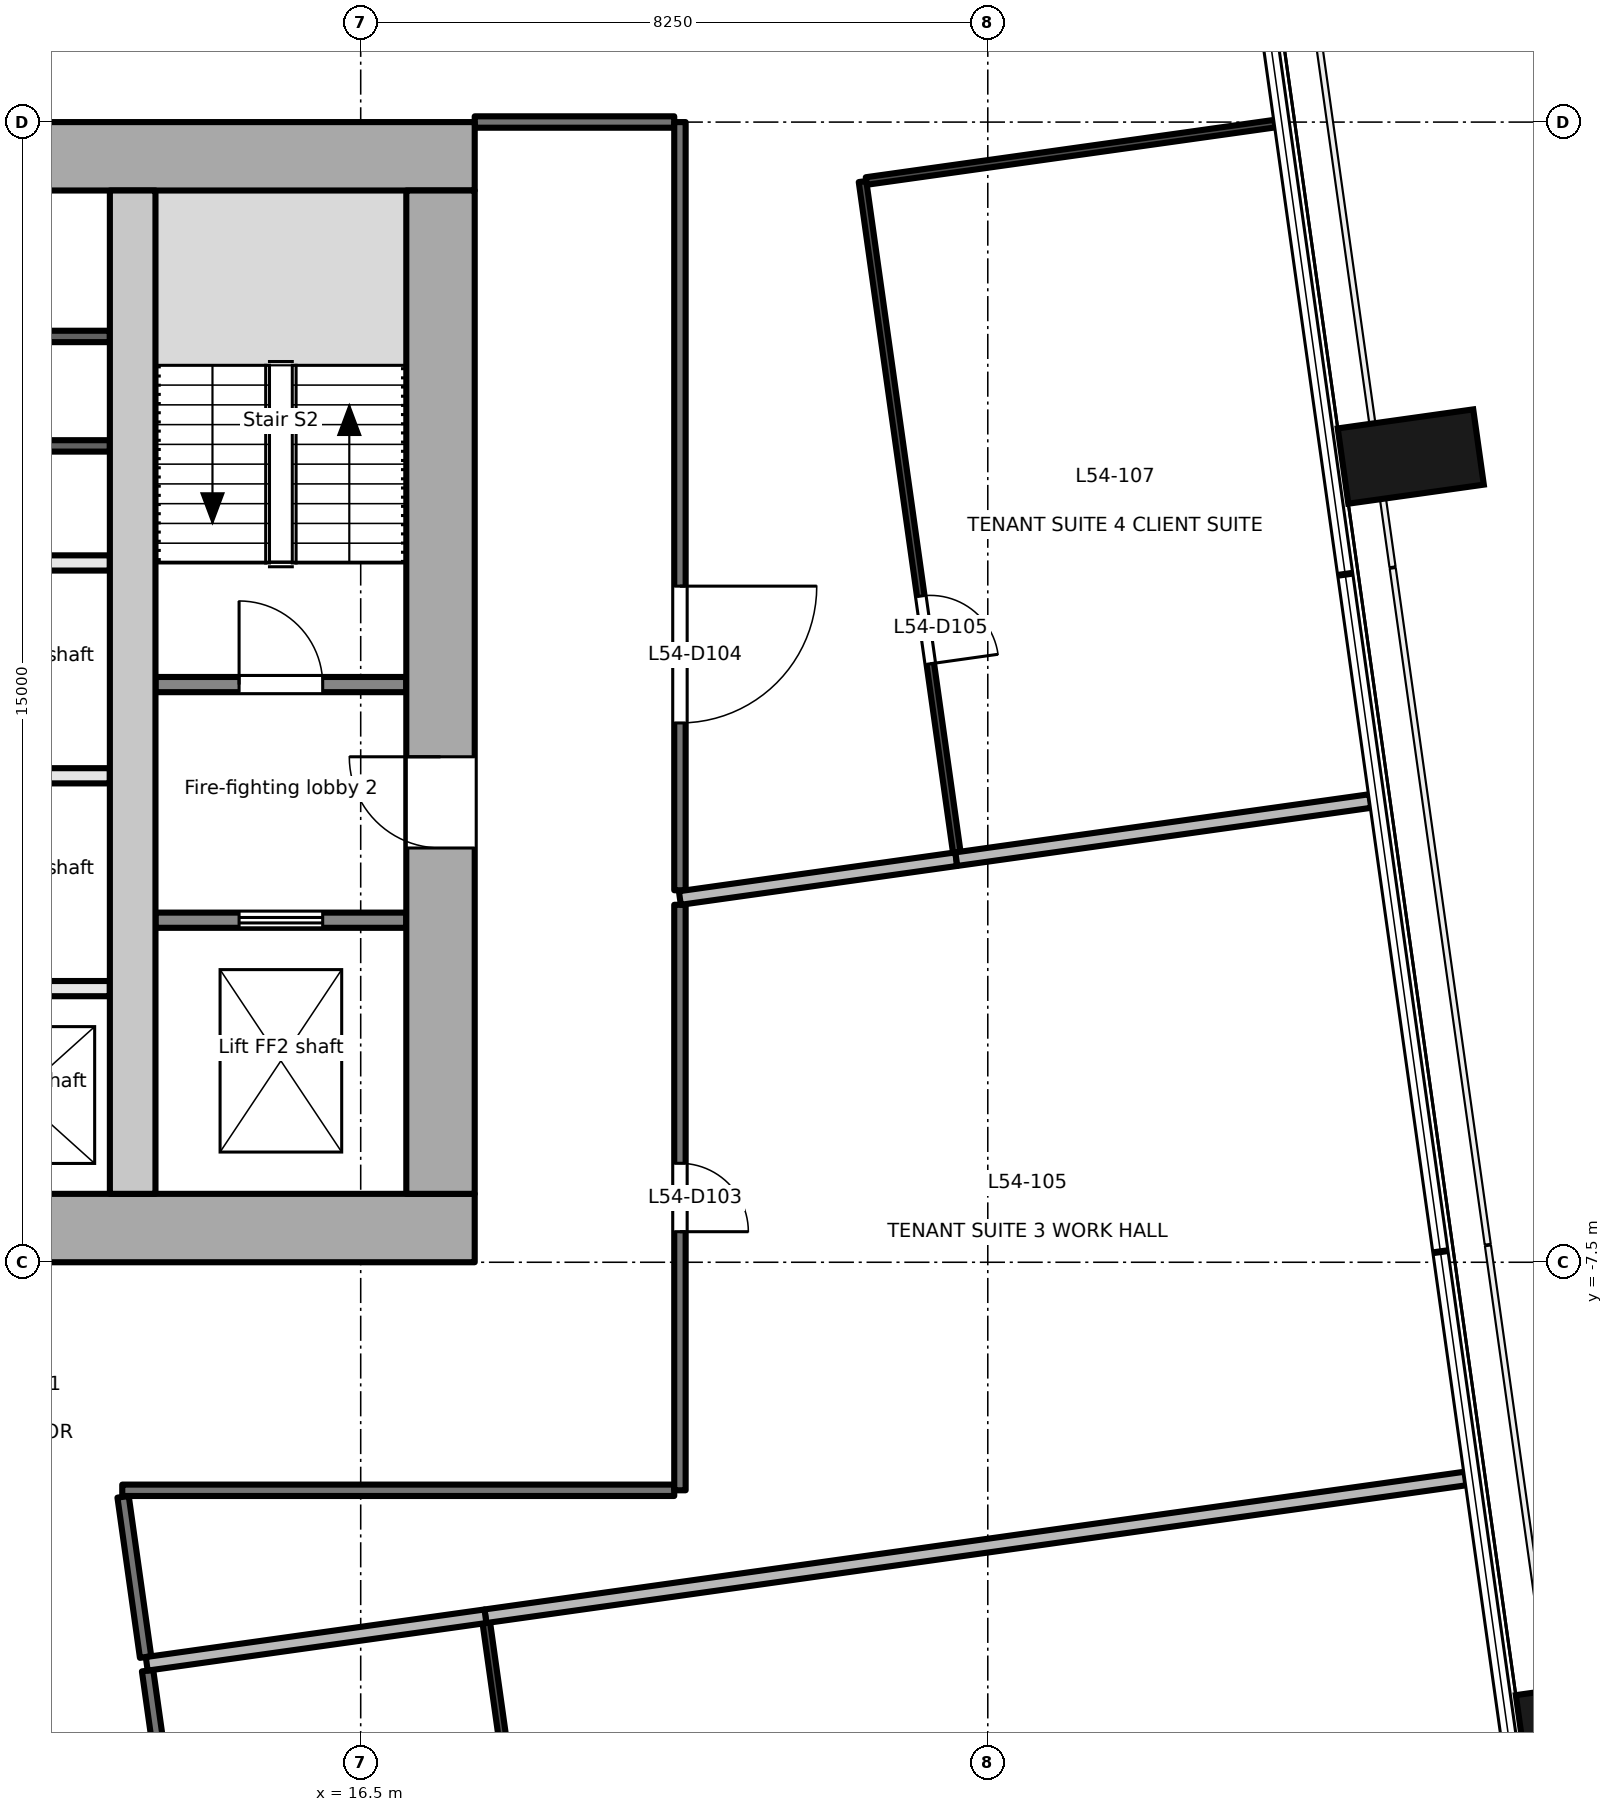
"""IFC4 building model, lengths in metres.
Left out: names, types, materials, properties, quantities, classifications, styles, units other than length and angle.
Written with IfcOpenShell. Run it as: python <this file> out.ifc"""

import sys

from ifc_helpers import new_model, si_unit, direction, frame, frame_2d, origin, origin_2d, place, context, subcontext, project, spatial, rectangle, extrude, element, fill, save


model = new_model("IFC4")
c1 = context("Model", 3, precision=1e-05, world=origin(), true_north=direction((0.0, 1.0)))
c2 = subcontext(c1, "Body", "Model", "MODEL_VIEW")
j1 = project(units=[si_unit("LENGTHUNIT", "METRE"), si_unit("PLANEANGLEUNIT", "RADIAN")], contexts=[c1])
p1 = place(None, origin())
s1 = spatial("IfcSite", under=j1, at=p1, CompositionType="ELEMENT")
p2 = place(p1, origin())
s2 = spatial("IfcBuilding", under=s1, at=p2, CompositionType="ELEMENT")
p3 = place(p2, frame((0.0, 0.0, 236.9)))
s3 = spatial("IfcBuildingStorey", under=s2, at=p3, CompositionType="ELEMENT", Elevation=236.9)
for number, where, z_axis, x_axis in (
    (1, (32.658, -13.565, -0.2), (0.0, 0.0, 1.0), (-0.139, 0.99, 0.0)),
    (2, (30.315, 3.1, -0.2), (0.0, 0.0, 1.0), (-0.139, 0.99, 0.0)),
):
    element("IfcColumn", number, at=place(p3, frame(where, z_axis=z_axis, x_axis=x_axis)), inside=s3, PredefinedType="COLUMN", context=c2, shape_type="SweptSolid", body=[
        extrude(rectangle(XDim=1.0, YDim=1.8, at=origin_2d()), origin(), (0.0, 0.0, 1.0), 3.9),
    ])
p4 = place(p3, frame((-18.0, -7.05, -0.2), z_axis=(0.0, 0.0, 1.0), x_axis=(1.0, 0.0, 0.0)))
e3 = element("IfcWall", 3, at=p4, inside=s3, PredefinedType="SHEAR", context=c2, shape_type="SweptSolid", body=[
    extrude(rectangle(XDim=36.0, YDim=0.9, at=frame_2d((18.0, 0.0))), origin(), (0.0, 0.0, 1.0), 3.9),
])
p5 = place(p4, frame((11.3, 0.0, 0.2)))
e4 = element("IfcOpeningElement", 4, at=p5, cuts=e3, PredefinedType="OPENING", context=c2, shape_type="SweptSolid", body=[
    extrude(rectangle(XDim=1.8, YDim=2.1, at=frame_2d((0.9, 1.05))), frame((0.0, 0.46, 0.0), z_axis=(0.0, -1.0, 0.0), x_axis=(1.0, 0.0, 0.0)), (0.0, 0.0, 1.0), 0.921),
])
p6 = place(p4, frame((16.8, 0.0, 0.2)))
e5 = element("IfcOpeningElement", 5, at=p6, cuts=e3, PredefinedType="OPENING", context=c2, shape_type="SweptSolid", body=[
    extrude(rectangle(XDim=2.4, YDim=2.1, at=frame_2d((1.2, 1.05))), frame((0.0, 0.46, 0.0), z_axis=(0.0, -1.0, 0.0), x_axis=(1.0, 0.0, 0.0)), (0.0, 0.0, 1.0), 0.921),
])
p7 = place(p4, frame((26.1, 0.0, 0.2)))
e6 = element("IfcOpeningElement", 6, at=p7, cuts=e3, PredefinedType="OPENING", context=c2, shape_type="SweptSolid", body=[
    extrude(rectangle(XDim=2.4, YDim=2.1, at=frame_2d((1.2, 1.05))), frame((0.0, 0.46, 0.0), z_axis=(0.0, -1.0, 0.0), x_axis=(1.0, 0.0, 0.0)), (0.0, 0.0, 1.0), 0.921),
])
p8 = place(p3, frame((-18.0, 7.05, -0.2), z_axis=(0.0, 0.0, 1.0), x_axis=(1.0, 0.0, 0.0)))
e7 = element("IfcWall", 7, at=p8, inside=s3, PredefinedType="SHEAR", context=c2, shape_type="SweptSolid", body=[
    extrude(rectangle(XDim=36.0, YDim=0.9, at=frame_2d((18.0, 0.0))), origin(), (0.0, 0.0, 1.0), 3.9),
])
p9 = place(p3, frame((17.55, -6.6, -0.2), z_axis=(0.0, 0.0, 1.0), x_axis=(0.0, 1.0, 0.0)))
e8 = element("IfcWall", 8, at=p9, inside=s3, PredefinedType="SHEAR", context=c2, shape_type="SweptSolid", body=[
    extrude(rectangle(XDim=13.2, YDim=0.9, at=frame_2d((6.6, 0.0))), origin(), (0.0, 0.0, 1.0), 3.9),
])
p10 = place(p9, frame((4.55, 0.0, 0.2)))
e9 = element("IfcOpeningElement", 9, at=p10, cuts=e8, PredefinedType="OPENING", context=c2, shape_type="SweptSolid", body=[
    extrude(rectangle(XDim=1.2, YDim=2.1, at=frame_2d((0.6, 1.05))), frame((0.0, 0.46, 0.0), z_axis=(0.0, -1.0, 0.0), x_axis=(1.0, 0.0, 0.0)), (0.0, 0.0, 1.0), 0.921),
])
p11 = place(p3, frame((13.5, -6.6, -0.2), z_axis=(0.0, 0.0, 1.0), x_axis=(0.0, 1.0, 0.0)))
e10 = element("IfcWall", 10, at=p11, inside=s3, PredefinedType="SHEAR", context=c2, shape_type="SweptSolid", body=[
    extrude(rectangle(XDim=13.2, YDim=0.6, at=frame_2d((6.6, 0.0))), origin(), (0.0, 0.0, 1.0), 3.9),
])
p12 = place(p3, frame((13.8, -3.0, 0.0), z_axis=(0.0, 0.0, 1.0), x_axis=(1.0, 0.0, 0.0)))
e11 = element("IfcWall", 11, at=p12, inside=s3, PredefinedType="PARTITIONING", context=c2, shape_type="SweptSolid", body=[
    extrude(rectangle(XDim=3.3, YDim=0.2, at=frame_2d((1.65, 0.0))), origin(), (0.0, 0.0, 1.0), 3.7),
])
p13 = place(p12, frame((1.1, 0.0, 0.0)))
e12 = element("IfcOpeningElement", 12, at=p13, cuts=e11, PredefinedType="OPENING", context=c2, shape_type="SweptSolid", body=[
    extrude(rectangle(XDim=1.1, YDim=2.1, at=frame_2d((0.55, 1.05))), frame((0.0, 0.111, 0.0), z_axis=(0.0, -1.0, 0.0), x_axis=(1.0, 0.0, 0.0)), (0.0, 0.0, 1.0), 0.221),
])
p14 = place(p3, frame((13.8, 0.1, 0.0), z_axis=(0.0, 0.0, 1.0), x_axis=(1.0, 0.0, 0.0)))
e13 = element("IfcWall", 13, at=p14, inside=s3, PredefinedType="PARTITIONING", context=c2, shape_type="SweptSolid", body=[
    extrude(rectangle(XDim=3.3, YDim=0.2, at=frame_2d((1.65, 0.0))), origin(), (0.0, 0.0, 1.0), 3.7),
])
p15 = place(p14, frame((1.1, 0.0, 0.0)))
e14 = element("IfcOpeningElement", 14, at=p15, cuts=e13, PredefinedType="OPENING", context=c2, shape_type="SweptSolid", body=[
    extrude(rectangle(XDim=1.1, YDim=2.1, at=frame_2d((0.55, 1.05))), frame((0.0, 0.111, 0.0), z_axis=(0.0, -1.0, 0.0), x_axis=(1.0, 0.0, 0.0)), (0.0, 0.0, 1.0), 0.221),
])
for number, where, z_axis, x_axis in (
    (15, (10.9, -3.9, 0.0), (0.0, 0.0, 1.0), (1.0, 0.0, 0.0)),
    (16, (10.9, -1.1, 0.0), (0.0, 0.0, 1.0), (1.0, 0.0, 0.0)),
    (17, (10.9, 1.7, 0.0), (0.0, 0.0, 1.0), (1.0, 0.0, 0.0)),
):
    element("IfcWall", number, at=place(p3, frame(where, z_axis=z_axis, x_axis=x_axis)), inside=s3, PredefinedType="PARTITIONING", context=c2, shape_type="SweptSolid", body=[
        extrude(rectangle(XDim=2.3, YDim=0.2, at=frame_2d((1.15, 0.0))), origin(), (0.0, 0.0, 1.0), 3.7),
    ])
for number, where, z_axis, x_axis in (
    (18, (10.9, 3.24, 0.0), (0.0, 0.0, 1.0), (1.0, 0.0, 0.0)),
    (19, (10.9, 4.68, 0.0), (0.0, 0.0, 1.0), (1.0, 0.0, 0.0)),
):
    element("IfcWall", number, at=place(p3, frame(where, z_axis=z_axis, x_axis=x_axis)), inside=s3, PredefinedType="PARTITIONING", context=c2, shape_type="SweptSolid", body=[
        extrude(rectangle(XDim=2.3, YDim=0.15, at=frame_2d((1.15, 0.0))), origin(), (0.0, 0.0, 1.0), 3.7),
    ])
p16 = place(p3, frame((13.696, -12.872, 0.0), z_axis=(0.0, 0.0, 1.0), x_axis=(0.139217899128, -0.990261771736, 0.0)))
e20 = element("IfcWall", 20, at=p16, inside=s3, PredefinedType="PARTITIONING", context=c2, shape_type="SweptSolid", body=[
    extrude(rectangle(XDim=7.09, YDim=0.15, at=frame_2d((3.545, 0.0))), origin(), (0.0, 0.0, 1.0), 2.9),
])
p17 = place(p3, frame((13.374, -10.586, 0.0), z_axis=(0.0, 0.0, 1.0), x_axis=(0.13899652087, -0.990292869401, 0.0)))
e21 = element("IfcWall", 21, at=p17, inside=s3, PredefinedType="PARTITIONING", context=c2, shape_type="SweptSolid", body=[
    extrude(rectangle(XDim=2.129, YDim=0.15, at=frame_2d((1.064, 0.0))), origin(), (0.0, 0.0, 1.0), 2.9),
])
p18 = place(p3, frame((20.625, -10.5, 0.0), z_axis=(0.0, 0.0, 1.0), x_axis=(-1.0, 0.0, 0.0)))
e22 = element("IfcWall", 22, at=p18, inside=s3, PredefinedType="PARTITIONING", context=c2, shape_type="SweptSolid", body=[
    extrude(rectangle(XDim=7.262, YDim=0.15, at=frame_2d((3.631, 0.0))), origin(), (0.0, 0.0, 1.0), 2.9),
])
p19 = place(p3, frame((20.7, -2.797, 0.0), z_axis=(0.0, 0.0, 1.0), x_axis=(0.0, -1.0, 0.0)))
e23 = element("IfcWall", 23, at=p19, inside=s3, PredefinedType="PARTITIONING", context=c2, shape_type="SweptSolid", body=[
    extrude(rectangle(XDim=7.703, YDim=0.15, at=frame_2d((3.852, 0.0))), origin(), (0.0, 0.0, 1.0), 3.1),
])
p20 = place(p19, frame((3.401, 0.0, 0.0)))
e24 = element("IfcOpeningElement", 24, at=p20, cuts=e23, PredefinedType="OPENING", context=c2, shape_type="SweptSolid", body=[
    extrude(rectangle(XDim=0.9, YDim=2.1, at=frame_2d((0.45, 1.05))), frame((0.0, 0.085, 0.0), z_axis=(0.0, -1.0, 0.0), x_axis=(1.0, 0.0, 0.0)), (0.0, 0.0, 1.0), 0.171),
])
p21 = place(p3, frame((18.0, 7.501, 0.0), z_axis=(0.0, 0.0, 1.0), x_axis=(1.0, 0.0, 0.0)))
e25 = element("IfcWall", 25, at=p21, inside=s3, PredefinedType="PARTITIONING", context=c2, shape_type="SweptSolid", body=[
    extrude(rectangle(XDim=2.625, YDim=0.15, at=frame_2d((1.312, 0.0))), origin(), (0.0, 0.0, 1.0), 3.7),
])
p22 = place(p3, frame((20.7, 7.5, 0.0), z_axis=(0.0, 0.0, 1.0), x_axis=(0.0, -1.0, 0.0)))
e26 = element("IfcWall", 26, at=p22, inside=s3, PredefinedType="PARTITIONING", context=c2, shape_type="SweptSolid", body=[
    extrude(rectangle(XDim=10.106, YDim=0.15, at=frame_2d((5.053, 0.0))), origin(), (0.0, 0.0, 1.0), 3.15),
])
p23 = place(p22, frame((6.105, 0.0, 0.0)))
e27 = element("IfcOpeningElement", 27, at=p23, cuts=e26, PredefinedType="OPENING", context=c2, shape_type="SweptSolid", body=[
    extrude(rectangle(XDim=1.8, YDim=2.1, at=frame_2d((0.9, 1.05))), frame((0.0, 0.085, 0.0), z_axis=(0.0, -1.0, 0.0), x_axis=(1.0, 0.0, 0.0)), (0.0, 0.0, 1.0), 0.171),
])
p24 = place(p3, frame((12.644, -24.785, 0.0), z_axis=(0.0, 0.0, 1.0), x_axis=(-0.139086535292, 0.990280230894, 0.0)))
e28 = element("IfcWall", 28, at=p24, inside=s3, PredefinedType="PARTITIONING", context=c2, shape_type="SweptSolid", body=[
    extrude(rectangle(XDim=11.669, YDim=0.15, at=frame_2d((5.835, 0.0))), origin(), (0.0, 0.0, 1.0), 3.7),
])
p25 = place(p24, frame((2.667, 0.0, 0.0)))
e29 = element("IfcOpeningElement", 29, at=p25, cuts=e28, PredefinedType="OPENING", context=c2, shape_type="SweptSolid", body=[
    extrude(rectangle(XDim=1.5, YDim=2.1, at=frame_2d((0.75, 1.05))), frame((0.0, 0.085, 0.0), z_axis=(0.0, -1.0, 0.0), x_axis=(1.0, 0.0, 0.0)), (0.0, 0.0, 1.0), 0.171),
])
p26 = place(p3, frame((19.137, -19.247, 0.0), z_axis=(0.0, 0.0, 1.0), x_axis=(-0.139168056016, 0.990268777749, 0.0)))
e30 = element("IfcWall", 30, at=p26, inside=s3, PredefinedType="PARTITIONING", context=c2, shape_type="SweptSolid", body=[
    extrude(rectangle(XDim=7.07, YDim=0.1, at=frame_2d((3.535, 0.0))), origin(), (0.0, 0.0, 1.0), 3.7),
])
p27 = place(p26, frame((3.085, 0.0, 0.0)))
e31 = element("IfcOpeningElement", 31, at=p27, cuts=e30, PredefinedType="OPENING", context=c2, shape_type="SweptSolid", body=[
    extrude(rectangle(XDim=0.9, YDim=2.1, at=frame_2d((0.45, 1.05))), frame((0.0, 0.061, 0.0), z_axis=(0.0, -1.0, 0.0), x_axis=(1.0, 0.0, 0.0)), (0.0, 0.0, 1.0), 0.121),
])
p28 = place(p3, frame((18.141, -12.157, 0.0), z_axis=(0.0, 0.0, 1.0), x_axis=(0.99026760598, 0.139176393637, 0.0)))
e32 = element("IfcWall", 32, at=p28, inside=s3, PredefinedType="PARTITIONING", context=c2, shape_type="SweptSolid", body=[
    extrude(rectangle(XDim=13.02, YDim=0.18, at=frame_2d((6.51, 0.0))), origin(), (0.0, 0.0, 1.0), 3.7),
])
p29 = place(p3, frame((13.685, -12.783, 0.0), z_axis=(0.0, 0.0, 1.0), x_axis=(0.99027667576, 0.139111845094, 0.0)))
e33 = element("IfcWall", 33, at=p29, inside=s3, PredefinedType="PARTITIONING", context=c2, shape_type="SweptSolid", body=[
    extrude(rectangle(XDim=4.5, YDim=0.18, at=frame_2d((2.25, 0.0))), origin(), (0.0, 0.0, 1.0), 3.7),
])
p30 = place(p3, frame((20.699, -2.708, 0.0), z_axis=(0.0, 0.0, 1.0), x_axis=(0.990268752824, 0.139168233375, 0.0)))
e34 = element("IfcWall", 34, at=p30, inside=s3, PredefinedType="PARTITIONING", context=c2, shape_type="SweptSolid", body=[
    extrude(rectangle(XDim=3.672, YDim=0.18, at=frame_2d((1.836, 0.0))), origin(), (0.0, 0.0, 1.0), 3.7),
])
p31 = place(p3, frame((24.336, -2.197, 0.0), z_axis=(0.0, 0.0, 1.0), x_axis=(0.990274457527, 0.139127634818, 0.0)))
e35 = element("IfcWall", 35, at=p31, inside=s3, PredefinedType="PARTITIONING", context=c2, shape_type="SweptSolid", body=[
    extrude(rectangle(XDim=5.5, YDim=0.18, at=frame_2d((2.75, 0.0))), origin(), (0.0, 0.0, 1.0), 3.7),
])
p32 = place(p3, frame((23.102, 6.718, 0.0), z_axis=(0.0, 0.0, 1.0), x_axis=(0.139172960551, -0.990268088475, 0.0)))
e36 = element("IfcWall", 36, at=p32, inside=s3, PredefinedType="PARTITIONING", context=c2, shape_type="SweptSolid", body=[
    extrude(rectangle(XDim=8.91, YDim=0.1, at=frame_2d((4.455, 0.0))), origin(), (0.0, 0.0, 1.0), 3.15),
])
p33 = place(p32, frame((5.507, 0.0, 0.0)))
e37 = element("IfcOpeningElement", 37, at=p33, cuts=e36, PredefinedType="OPENING", context=c2, shape_type="SweptSolid", body=[
    extrude(rectangle(XDim=0.9, YDim=2.1, at=frame_2d((0.45, 1.05))), frame((0.0, 0.061, 0.0), z_axis=(0.0, -1.0, 0.0), x_axis=(1.0, 0.0, 0.0)), (0.0, 0.0, 1.0), 0.121),
])
p34 = place(p3, frame((28.528, 7.48, 0.0), z_axis=(0.0, 0.0, 1.0), x_axis=(-0.990284853007, -0.139053622411, 0.0)))
e38 = element("IfcWall", 38, at=p34, inside=s3, PredefinedType="PARTITIONING", context=c2, shape_type="SweptSolid", body=[
    extrude(rectangle(XDim=5.429, YDim=0.1, at=frame_2d((2.714, 0.0))), origin(), (0.0, 0.0, 1.0), 3.7),
])
p35 = place(p13, origin())
e39 = element("IfcDoor", 39, at=p35, inside=s3, OperationType="DOUBLE_DOOR_SLIDING", PredefinedType="DOOR", context=c2, shape_type="SweptSolid", body=[
    extrude(rectangle(XDim=1.1, YDim=2.1, at=frame_2d((0.55, 1.05))), frame((0.0, 0.025, 0.0), z_axis=(0.0, -1.0, 0.0), x_axis=(1.0, 0.0, 0.0)), (0.0, 0.0, 1.0), 0.05),
])
fill(e12, e39)
p36 = place(p10, origin())
e40 = element("IfcDoor", 40, at=p36, inside=s3, OperationType="SINGLE_SWING_RIGHT", PredefinedType="DOOR", context=c2, shape_type="SweptSolid", body=[
    extrude(rectangle(XDim=1.2, YDim=2.1, at=frame_2d((0.6, 1.05))), frame((0.0, 0.025, 0.0), z_axis=(0.0, -1.0, 0.0), x_axis=(1.0, 0.0, 0.0)), (0.0, 0.0, 1.0), 0.05),
])
fill(e9, e40)
p37 = place(p15, origin())
e41 = element("IfcDoor", 41, at=p37, inside=s3, OperationType="SINGLE_SWING_LEFT", PredefinedType="DOOR", context=c2, shape_type="SweptSolid", body=[
    extrude(rectangle(XDim=1.1, YDim=2.1, at=frame_2d((0.55, 1.05))), frame((0.0, 0.025, 0.0), z_axis=(0.0, -1.0, 0.0), x_axis=(1.0, 0.0, 0.0)), (0.0, 0.0, 1.0), 0.05),
])
fill(e14, e41)
p38 = place(p20, origin())
e42 = element("IfcDoor", 42, at=p38, inside=s3, OperationType="SINGLE_SWING_RIGHT", PredefinedType="DOOR", context=c2, shape_type="SweptSolid", body=[
    extrude(rectangle(XDim=0.9, YDim=2.1, at=frame_2d((0.45, 1.05))), frame((0.0, 0.025, 0.0), z_axis=(0.0, -1.0, 0.0), x_axis=(1.0, 0.0, 0.0)), (0.0, 0.0, 1.0), 0.05),
])
fill(e24, e42)
p39 = place(p23, origin())
e43 = element("IfcDoor", 43, at=p39, inside=s3, OperationType="DOUBLE_DOOR_SINGLE_SWING", PredefinedType="DOOR", context=c2, shape_type="SweptSolid", body=[
    extrude(rectangle(XDim=1.8, YDim=2.1, at=frame_2d((0.9, 1.05))), frame((0.0, 0.025, 0.0), z_axis=(0.0, -1.0, 0.0), x_axis=(1.0, 0.0, 0.0)), (0.0, 0.0, 1.0), 0.05),
])
fill(e27, e43)
p40 = place(p33, origin())
e44 = element("IfcDoor", 44, at=p40, inside=s3, OperationType="SINGLE_SWING_RIGHT", PredefinedType="DOOR", context=c2, shape_type="SweptSolid", body=[
    extrude(rectangle(XDim=0.9, YDim=2.1, at=frame_2d((0.45, 1.05))), frame((0.0, 0.025, 0.0), z_axis=(0.0, -1.0, 0.0), x_axis=(1.0, 0.0, 0.0)), (0.0, 0.0, 1.0), 0.05),
])
fill(e37, e44)
save(model, sys.argv[1])
